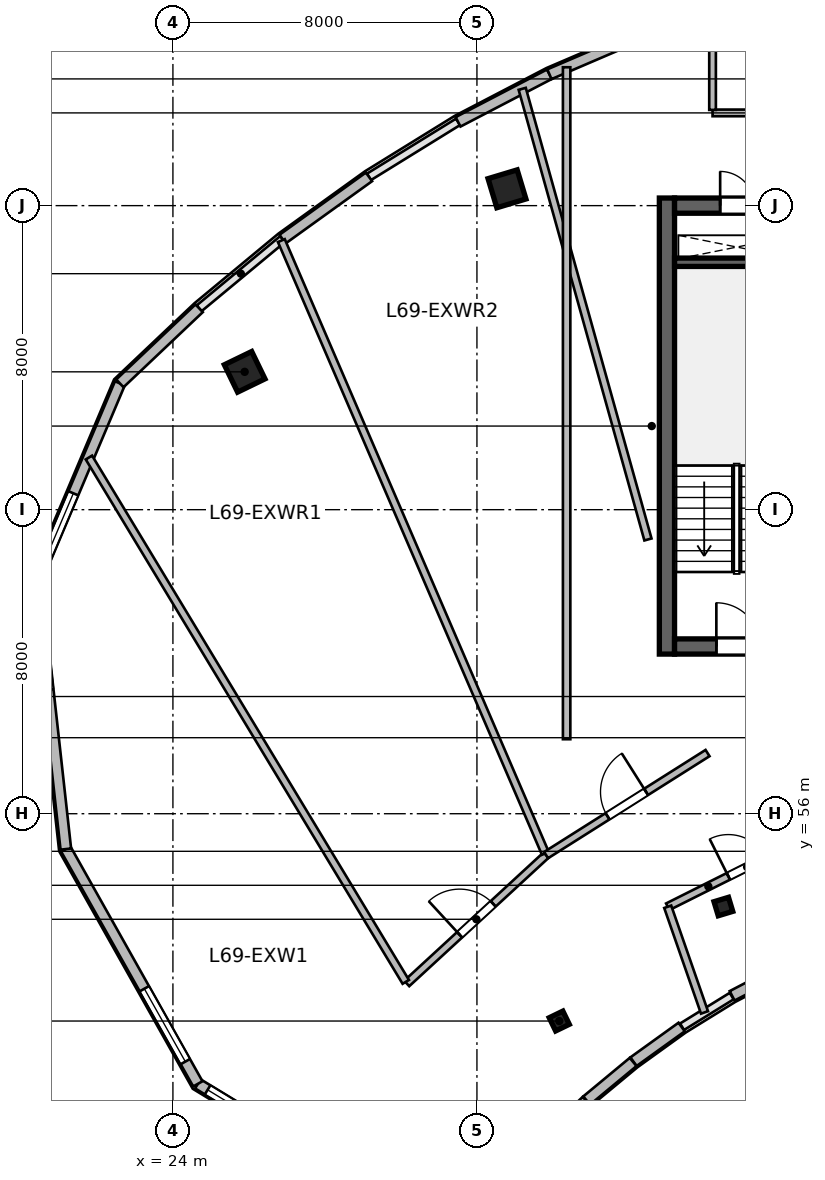
"""IFC4 building model, lengths in metres.
Left out: names, types, materials, properties, quantities, classifications, styles, units other than length and angle.
Written with IfcOpenShell. Run it as: python <this file> out.ifc"""

import sys

from ifc_helpers import new_model, si_unit, direction, frame, frame_2d, origin, origin_2d, place, context, subcontext, project, spatial, rectangle, i_section, extrude, source, transform, mapped, element, fill, save


model = new_model("IFC4")
c1 = context("Model", 3, precision=1e-05, world=origin(), true_north=direction((0.0, 1.0)))
c2 = subcontext(c1, "Body", "Model", "MODEL_VIEW")
j1 = project(units=[si_unit("LENGTHUNIT", "METRE"), si_unit("PLANEANGLEUNIT", "RADIAN")], contexts=[c1])
p1 = place(None, origin())
s1 = spatial("IfcSite", under=j1, at=p1, CompositionType="ELEMENT")
p2 = place(p1, origin())
s2 = spatial("IfcBuilding", under=s1, at=p2, CompositionType="ELEMENT")
p3 = place(p2, frame((0.0, 0.0, 283.5)))
s3 = spatial("IfcBuildingStorey", under=s2, at=p3, CompositionType="ELEMENT", Elevation=283.5)
m1 = source(origin(), c2, "Body", "SweptSolid", [
    extrude(rectangle(XDim=12.0, YDim=0.4, at=frame_2d((6.0, 0.0))), origin(), (0.0, 0.0, 1.0), 3.9),
])
p4 = place(p3, frame((37.0, 60.2, 0.0), z_axis=(0.0, 0.0, 1.0), x_axis=(0.0, 1.0, 0.0)))
e1 = element("IfcWall", 1, at=p4, inside=s3, PredefinedType="SHEAR", context=c2, shape_type="MappedRepresentation", body=[
    mapped(m1, transform((0.0, 0.0, 0.0), scale=1.0)),
])
m2 = source(origin(), c2, "Body", "SweptSolid", [
    extrude(rectangle(XDim=21.6, YDim=0.4, at=frame_2d((10.8, 0.0))), origin(), (0.0, 0.0, 1.0), 3.9),
])
p5 = place(p3, frame((37.2, 60.4, 0.0), z_axis=(0.0, 0.0, 1.0), x_axis=(1.0, 0.0, 0.0)))
e2 = element("IfcWall", 2, at=p5, inside=s3, PredefinedType="SHEAR", context=c2, shape_type="MappedRepresentation", body=[
    mapped(m2, transform((0.0, 0.0, 0.0), scale=1.0)),
])
p6 = place(p5, frame((1.1, 0.0, 0.0)))
e3 = element("IfcOpeningElement", 3, at=p6, cuts=e2, PredefinedType="OPENING", context=c2, shape_type="SweptSolid", body=[
    extrude(rectangle(XDim=1.15, YDim=2.15, at=frame_2d((0.575, 1.075))), frame((0.0, 0.21, 0.0), z_axis=(0.0, -1.0, 0.0), x_axis=(1.0, 0.0, 0.0)), (0.0, 0.0, 1.0), 0.42),
])
p7 = place(p5, frame((19.5, 0.0, 0.0)))
e4 = element("IfcOpeningElement", 4, at=p7, cuts=e2, PredefinedType="OPENING", context=c2, shape_type="SweptSolid", body=[
    extrude(rectangle(XDim=0.9, YDim=2.1, at=frame_2d((0.45, 1.05))), frame((0.0, 0.21, 0.0), z_axis=(0.0, -1.0, 0.0), x_axis=(1.0, 0.0, 0.0)), (0.0, 0.0, 1.0), 0.42),
])
p8 = place(p5, frame((12.02, 0.0, 0.0)))
e5 = element("IfcOpeningElement", 5, at=p8, cuts=e2, PredefinedType="OPENING", context=c2, shape_type="SweptSolid", body=[
    extrude(rectangle(XDim=1.6, YDim=2.15, at=frame_2d((0.8, 1.075))), frame((0.0, 0.21, 0.0), z_axis=(0.0, -1.0, 0.0), x_axis=(1.0, 0.0, 0.0)), (0.0, 0.0, 1.0), 0.42),
])
p9 = place(p3, frame((37.2, 72.0, 0.0), z_axis=(0.0, 0.0, 1.0), x_axis=(1.0, 0.0, 0.0)))
e6 = element("IfcWall", 6, at=p9, inside=s3, PredefinedType="SHEAR", context=c2, shape_type="MappedRepresentation", body=[
    mapped(m2, transform((0.0, 0.0, 0.0), scale=1.0)),
])
p10 = place(p9, frame((1.2, 0.0, 0.0)))
e7 = element("IfcOpeningElement", 7, at=p10, cuts=e6, PredefinedType="OPENING", context=c2, shape_type="SweptSolid", body=[
    extrude(rectangle(XDim=0.9, YDim=2.1, at=frame_2d((0.45, 1.05))), frame((0.0, 0.21, 0.0), z_axis=(0.0, -1.0, 0.0), x_axis=(1.0, 0.0, 0.0)), (0.0, 0.0, 1.0), 0.42),
])
p11 = place(p9, frame((14.7, 0.0, 0.0)))
e8 = element("IfcOpeningElement", 8, at=p11, cuts=e6, PredefinedType="OPENING", context=c2, shape_type="SweptSolid", body=[
    extrude(rectangle(XDim=1.2, YDim=2.15, at=frame_2d((0.6, 1.075))), frame((0.0, 0.21, 0.0), z_axis=(0.0, -1.0, 0.0), x_axis=(1.0, 0.0, 0.0)), (0.0, 0.0, 1.0), 0.42),
])
p12 = place(p9, frame((4.15, 0.0, 0.0)))
e9 = element("IfcOpeningElement", 9, at=p12, cuts=e6, PredefinedType="OPENING", context=c2, shape_type="SweptSolid", body=[
    extrude(rectangle(XDim=1.3, YDim=2.15, at=frame_2d((0.65, 1.075))), frame((0.0, 0.21, 0.0), z_axis=(0.0, -1.0, 0.0), x_axis=(1.0, 0.0, 0.0)), (0.0, 0.0, 1.0), 0.42),
])
p13 = place(p9, frame((7.25, 0.0, 0.0)))
e10 = element("IfcOpeningElement", 10, at=p13, cuts=e6, PredefinedType="OPENING", context=c2, shape_type="SweptSolid", body=[
    extrude(rectangle(XDim=0.9, YDim=2.1, at=frame_2d((0.45, 1.05))), frame((0.0, 0.21, 0.0), z_axis=(0.0, -1.0, 0.0), x_axis=(1.0, 0.0, 0.0)), (0.0, 0.0, 1.0), 0.42),
])
m3 = source(origin(), c2, "Body", "SweptSolid", [
    extrude(rectangle(XDim=3.27, YDim=0.22, at=frame_2d((1.635, 0.0))), origin(), (0.0, 0.0, 1.0), 3.9),
])
p14 = place(p3, frame((37.2, 70.51, 0.0), z_axis=(0.0, 0.0, 1.0), x_axis=(1.0, 0.0, 0.0)))
e11 = element("IfcWall", 11, at=p14, inside=s3, PredefinedType="SHEAR", context=c2, shape_type="MappedRepresentation", body=[
    mapped(m3, transform((0.0, 0.0, 0.0), scale=1.0)),
])
m4 = source(origin(), c2, "Body", "SweptSolid", [
    extrude(i_section(OverallWidth=0.399, OverallDepth=0.387, WebThickness=0.021, FlangeThickness=0.033, at=origin_2d()), origin(), (0.0, 0.0, 1.0), 3.9),
])
p15 = place(p3, frame((34.166, 50.545, 0.0), z_axis=(0.0, 0.0, 1.0), x_axis=(-0.436173672171, 0.899862504889, 0.0)))
e12 = element("IfcColumn", 12, at=p15, inside=s3, PredefinedType="COLUMN", context=c2, shape_type="MappedRepresentation", body=[
    mapped(m4, transform((0.0, 0.0, 0.0), scale=1.0)),
])
m5 = source(origin(), c2, "Body", "SweptSolid", [
    extrude(rectangle(XDim=0.8, YDim=0.8, at=origin_2d()), origin(), (0.0, 0.0, 1.0), 3.9),
])
p16 = place(p3, frame((25.888, 67.627, 0.0), z_axis=(0.0, 0.0, 1.0), x_axis=(-0.436173672171, 0.899862504889, 0.0)))
e13 = element("IfcColumn", 13, at=p16, inside=s3, PredefinedType="COLUMN", context=c2, shape_type="MappedRepresentation", body=[
    mapped(m5, transform((0.0, 0.0, 0.0), scale=1.0)),
])
p17 = place(p3, frame((38.485, 53.558, 0.0), z_axis=(0.0, 0.0, 1.0), x_axis=(-0.288697611798, 0.957420330337, 0.0)))
e14 = element("IfcColumn", 14, at=p17, inside=s3, PredefinedType="COLUMN", context=c2, shape_type="MappedRepresentation", body=[
    mapped(m4, transform((0.0, 0.0, 0.0), scale=1.0)),
])
p18 = place(p3, frame((32.791, 72.442, 0.0), z_axis=(0.0, 0.0, 1.0), x_axis=(-0.288697611798, 0.957420330337, 0.0)))
e15 = element("IfcColumn", 15, at=p18, inside=s3, PredefinedType="COLUMN", context=c2, shape_type="MappedRepresentation", body=[
    mapped(m5, transform((0.0, 0.0, 0.0), scale=1.0)),
])
m6 = source(origin(), c2, "Body", "SweptSolid", [
    extrude(rectangle(XDim=1.512, YDim=0.28, at=frame_2d((0.756, 0.0))), origin(), (0.0, 0.0, 1.0), 3.64),
])
p19 = place(p3, frame((40.056, 51.906, 0.0), z_axis=(0.0, 0.0, 1.0), x_axis=(-0.886841011195, -0.462074691865, 0.0)))
e16 = element("IfcWall", 16, at=p19, inside=s3, PredefinedType="SOLIDWALL", context=c2, shape_type="MappedRepresentation", body=[
    mapped(m6, transform((0.0, 0.0, 0.0), scale=1.0)),
])
m7 = source(origin(), c2, "Body", "SweptSolid", [
    extrude(rectangle(XDim=1.561, YDim=0.28, at=frame_2d((0.781, 0.0))), origin(), (0.0, 0.0, 1.0), 3.64),
])
p20 = place(p3, frame((37.387, 50.387, 0.0), z_axis=(0.0, 0.0, 1.0), x_axis=(-0.81154027425, -0.584296485758, 0.0)))
e17 = element("IfcWall", 17, at=p20, inside=s3, PredefinedType="SOLIDWALL", context=c2, shape_type="MappedRepresentation", body=[
    mapped(m7, transform((0.0, 0.0, 0.0), scale=1.0)),
])
m8 = source(origin(), c2, "Body", "SweptSolid", [
    extrude(rectangle(XDim=1.589, YDim=0.28, at=frame_2d((0.794, 0.0))), origin(), (0.0, 0.0, 1.0), 3.64),
])
p21 = place(p3, frame((36.11, 49.468, 0.0), z_axis=(0.0, 0.0, 1.0), x_axis=(-0.769805836273, -0.63827813251, 0.0)))
e18 = element("IfcWall", 18, at=p21, inside=s3, PredefinedType="SOLIDWALL", context=c2, shape_type="MappedRepresentation", body=[
    mapped(m8, transform((0.0, 0.0, 0.0), scale=1.0)),
])
m9 = source(origin(), c2, "Body", "SweptSolid", [
    extrude(rectangle(XDim=1.577, YDim=0.28, at=frame_2d((0.789, 0.0))), origin(), (0.0, 0.0, 1.0), 3.64),
])
p22 = place(p3, frame((34.878, 48.446, 0.0), z_axis=(0.0, 0.0, 1.0), x_axis=(-0.726119464467, -0.687568558998, 0.0)))
e19 = element("IfcWall", 19, at=p22, inside=s3, PredefinedType="SOLIDWALL", context=c2, shape_type="MappedRepresentation", body=[
    mapped(m9, transform((0.0, 0.0, 0.0), scale=1.0)),
])
m10 = source(origin(), c2, "Body", "SweptSolid", [
    extrude(rectangle(XDim=5.604, YDim=0.28, at=frame_2d((2.802, 0.0))), origin(), (0.0, 0.0, 1.0), 3.64),
])
p23 = place(p3, frame((29.442, 45.976, 0.0), z_axis=(0.0, 0.0, 1.0), x_axis=(-0.854002492971, 0.520268913158, 0.0)))
e20 = element("IfcWall", 20, at=p23, inside=s3, PredefinedType="SOLIDWALL", context=c2, shape_type="MappedRepresentation", body=[
    mapped(m10, transform((0.0, 0.0, 0.0), scale=1.0)),
])
p24 = place(p23, frame((3.103, 0.0, 0.95)))
e21 = element("IfcOpeningElement", 21, at=p24, cuts=e20, PredefinedType="OPENING", context=c2, shape_type="SweptSolid", body=[
    extrude(rectangle(XDim=2.2, YDim=2.1, at=frame_2d((1.1, 1.05))), frame((0.0, 0.15, 0.0), z_axis=(0.0, -1.0, 0.0), x_axis=(1.0, 0.0, 0.0)), (0.0, 0.0, 1.0), 0.3),
])
m11 = source(origin(), c2, "Body", "SweptSolid", [
    extrude(rectangle(XDim=7.087, YDim=0.28, at=frame_2d((3.543, 0.0))), origin(), (0.0, 0.0, 1.0), 3.64),
])
p25 = place(p3, frame((24.656, 48.892, 0.0), z_axis=(0.0, 0.0, 1.0), x_axis=(-0.490158199368, 0.871633489256, 0.0)))
e22 = element("IfcWall", 22, at=p25, inside=s3, PredefinedType="SOLIDWALL", context=c2, shape_type="MappedRepresentation", body=[
    mapped(m11, transform((0.0, 0.0, 0.0), scale=1.0)),
])
p26 = place(p25, frame((0.672, 0.0, 0.95)))
e23 = element("IfcOpeningElement", 23, at=p26, cuts=e22, PredefinedType="OPENING", context=c2, shape_type="SweptSolid", body=[
    extrude(rectangle(XDim=2.2, YDim=2.1, at=frame_2d((1.1, 1.05))), frame((0.0, 0.15, 0.0), z_axis=(0.0, -1.0, 0.0), x_axis=(1.0, 0.0, 0.0)), (0.0, 0.0, 1.0), 0.3),
])
m12 = source(origin(), c2, "Body", "SweptSolid", [
    extrude(rectangle(XDim=7.09, YDim=0.28, at=frame_2d((3.545, 0.0))), origin(), (0.0, 0.0, 1.0), 3.64),
])
p27 = place(p3, frame((21.182, 55.069, 0.0), z_axis=(0.0, 0.0, 1.0), x_axis=(-0.110159396922, 0.993913933532, 0.0)))
e24 = element("IfcWall", 24, at=p27, inside=s3, PredefinedType="SOLIDWALL", context=c2, shape_type="MappedRepresentation", body=[
    mapped(m12, transform((0.0, 0.0, 0.0), scale=1.0)),
])
p28 = place(p27, frame((4.217, 0.0, 0.95)))
e25 = element("IfcOpeningElement", 25, at=p28, cuts=e24, PredefinedType="OPENING", context=c2, shape_type="SweptSolid", body=[
    extrude(rectangle(XDim=2.2, YDim=2.1, at=frame_2d((1.1, 1.05))), frame((0.0, 0.15, 0.0), z_axis=(0.0, -1.0, 0.0), x_axis=(1.0, 0.0, 0.0)), (0.0, 0.0, 1.0), 0.3),
])
m13 = source(origin(), c2, "Body", "SweptSolid", [
    extrude(rectangle(XDim=5.655, YDim=0.28, at=frame_2d((2.828, 0.0))), origin(), (0.0, 0.0, 1.0), 3.64),
])
p29 = place(p3, frame((20.401, 62.116, 0.0), z_axis=(0.0, 0.0, 1.0), x_axis=(0.389585063528, 0.920990487614, 0.0)))
e26 = element("IfcWall", 26, at=p29, inside=s3, PredefinedType="SOLIDWALL", context=c2, shape_type="MappedRepresentation", body=[
    mapped(m13, transform((0.0, 0.0, 0.0), scale=1.0)),
])
p30 = place(p29, frame((0.314, 0.0, 0.95)))
e27 = element("IfcOpeningElement", 27, at=p30, cuts=e26, PredefinedType="OPENING", context=c2, shape_type="SweptSolid", body=[
    extrude(rectangle(XDim=2.2, YDim=2.1, at=frame_2d((1.1, 1.05))), frame((0.0, 0.15, 0.0), z_axis=(0.0, -1.0, 0.0), x_axis=(1.0, 0.0, 0.0)), (0.0, 0.0, 1.0), 0.3),
])
m14 = source(origin(), c2, "Body", "SweptSolid", [
    extrude(rectangle(XDim=2.873, YDim=0.28, at=frame_2d((1.436, 0.0))), origin(), (0.0, 0.0, 1.0), 3.64),
])
p31 = place(p3, frame((22.604, 67.324, 0.0), z_axis=(0.0, 0.0, 1.0), x_axis=(0.72609560544, 0.687593754888, 0.0)))
e28 = element("IfcWall", 28, at=p31, inside=s3, PredefinedType="SOLIDWALL", context=c2, shape_type="MappedRepresentation", body=[
    mapped(m14, transform((0.0, 0.0, 0.0), scale=1.0)),
])
m15 = source(origin(), c2, "Body", "SweptSolid", [
    extrude(rectangle(XDim=2.802, YDim=0.28, at=frame_2d((1.401, 0.0))), origin(), (0.0, 0.0, 1.0), 3.64),
])
p32 = place(p3, frame((26.885, 71.12, 0.0), z_axis=(0.0, 0.0, 1.0), x_axis=(0.811507896482, 0.584341453217, 0.0)))
e29 = element("IfcWall", 29, at=p32, inside=s3, PredefinedType="SOLIDWALL", context=c2, shape_type="MappedRepresentation", body=[
    mapped(m15, transform((0.0, 0.0, 0.0), scale=1.0)),
])
m16 = source(origin(), c2, "Body", "SweptSolid", [
    extrude(rectangle(XDim=2.711, YDim=0.28, at=frame_2d((1.356, 0.0))), origin(), (0.0, 0.0, 1.0), 3.64),
])
p33 = place(p3, frame((31.502, 74.205, 0.0), z_axis=(0.0, 0.0, 1.0), x_axis=(0.886828760751, 0.462098202881, 0.0)))
e30 = element("IfcWall", 30, at=p33, inside=s3, PredefinedType="SOLIDWALL", context=c2, shape_type="MappedRepresentation", body=[
    mapped(m16, transform((0.0, 0.0, 0.0), scale=1.0)),
])
m17 = source(origin(), c2, "Body", "SweptSolid", [
    extrude(rectangle(XDim=2.673, YDim=0.28, at=frame_2d((1.337, 0.0))), origin(), (0.0, 0.0, 1.0), 3.64),
])
p34 = place(p3, frame((33.907, 75.458, 0.0), z_axis=(0.0, 0.0, 1.0), x_axis=(0.919036345912, 0.394172798266, 0.0)))
e31 = element("IfcWall", 31, at=p34, inside=s3, PredefinedType="SOLIDWALL", context=c2, shape_type="MappedRepresentation", body=[
    mapped(m17, transform((0.0, 0.0, 0.0), scale=1.0)),
])
m18 = source(origin(), c2, "Body", "SweptSolid", [
    extrude(rectangle(XDim=4.0, YDim=0.175, at=frame_2d((2.0, 0.0))), origin(), (0.0, 0.0, 1.0), 3.64),
])
p35 = place(p3, frame((38.2, 74.44, 0.0), z_axis=(0.0, 0.0, 1.0), x_axis=(1.0, 0.0, 0.0)))
e32 = element("IfcWall", 32, at=p35, inside=s3, PredefinedType="PARTITIONING", context=c2, shape_type="MappedRepresentation", body=[
    mapped(m18, transform((0.0, 0.0, 0.0), scale=1.0)),
])
p36 = place(p35, frame((2.7, 0.0, 0.0)))
e33 = element("IfcOpeningElement", 33, at=p36, cuts=e32, PredefinedType="OPENING", context=c2, shape_type="SweptSolid", body=[
    extrude(rectangle(XDim=0.9, YDim=2.08, at=frame_2d((0.45, 1.04))), frame((0.0, 0.098, 0.0), z_axis=(0.0, -1.0, 0.0), x_axis=(1.0, 0.0, 0.0)), (0.0, 0.0, 1.0), 0.195),
])
m19 = source(origin(), c2, "Body", "SweptSolid", [
    extrude(rectangle(XDim=2.403, YDim=0.175, at=frame_2d((1.201, 0.0))), origin(), (0.0, 0.0, 1.0), 3.64),
])
p37 = place(p3, frame((38.2, 74.519, 0.0), z_axis=(0.0, 0.0, 1.0), x_axis=(0.0, 1.0, 0.0)))
e34 = element("IfcWall", 34, at=p37, inside=s3, PredefinedType="PARTITIONING", context=c2, shape_type="MappedRepresentation", body=[
    mapped(m19, transform((0.0, 0.0, 0.0), scale=1.0)),
])
m20 = source(origin(), c2, "Body", "SweptSolid", [
    extrude(rectangle(XDim=4.271, YDim=0.195, at=frame_2d((2.135, 0.0))), origin(), (0.0, 0.0, 1.0), 3.64),
])
p38 = place(p3, frame((37.021, 53.552, 0.0), z_axis=(0.0, 0.0, 1.0), x_axis=(0.894061035522, 0.447945158207, 0.0)))
e35 = element("IfcWall", 35, at=p38, inside=s3, PredefinedType="PARTITIONING", context=c2, shape_type="MappedRepresentation", body=[
    mapped(m20, transform((0.0, 0.0, 0.0), scale=1.0)),
])
p39 = place(p38, frame((1.785, 0.0, 0.0)))
e36 = element("IfcOpeningElement", 36, at=p39, cuts=e35, PredefinedType="OPENING", context=c2, shape_type="SweptSolid", body=[
    extrude(rectangle(XDim=1.1, YDim=2.15, at=frame_2d((0.55, 1.075))), frame((0.0, 0.107, 0.0), z_axis=(0.0, -1.0, 0.0), x_axis=(1.0, 0.0, 0.0)), (0.0, 0.0, 1.0), 0.215),
])
m21 = source(origin(), c2, "Body", "SweptSolid", [
    extrude(rectangle(XDim=2.944, YDim=0.195, at=frame_2d((1.472, 0.0))), origin(), (0.0, 0.0, 1.0), 3.64),
])
p40 = place(p3, frame((37.988, 50.771, 0.0), z_axis=(0.0, 0.0, 1.0), x_axis=(-0.328565655286, 0.944481132774, 0.0)))
e37 = element("IfcWall", 37, at=p40, inside=s3, PredefinedType="PARTITIONING", context=c2, shape_type="MappedRepresentation", body=[
    mapped(m21, transform((0.0, 0.0, 0.0), scale=1.0)),
])
m22 = source(origin(), c2, "Body", "SweptSolid", [
    extrude(rectangle(XDim=4.986, YDim=0.195, at=frame_2d((2.493, 0.0))), origin(), (0.0, 0.0, 1.0), 3.64),
])
p41 = place(p3, frame((30.153, 51.533, 0.0), z_axis=(0.0, 0.0, 1.0), x_axis=(0.735595190169, 0.677421372707, 0.0)))
e38 = element("IfcWall", 38, at=p41, inside=s3, PredefinedType="PARTITIONING", context=c2, shape_type="MappedRepresentation", body=[
    mapped(m22, transform((0.0, 0.0, 0.0), scale=1.0)),
])
p42 = place(p41, frame((1.893, 0.0, 0.0)))
e39 = element("IfcOpeningElement", 39, at=p42, cuts=e38, PredefinedType="OPENING", context=c2, shape_type="SweptSolid", body=[
    extrude(rectangle(XDim=1.2, YDim=2.15, at=frame_2d((0.6, 1.075))), frame((0.0, 0.107, 0.0), z_axis=(0.0, -1.0, 0.0), x_axis=(1.0, 0.0, 0.0)), (0.0, 0.0, 1.0), 0.215),
])
m23 = source(origin(), c2, "Body", "SweptSolid", [
    extrude(rectangle(XDim=16.121, YDim=0.195, at=frame_2d((8.061, 0.0))), origin(), (0.0, 0.0, 1.0), 3.64),
])
p43 = place(p3, frame((30.127, 51.575, 0.0), z_axis=(0.0, 0.0, 1.0), x_axis=(-0.517212483904, 0.855857024563, 0.0)))
e40 = element("IfcWall", 40, at=p43, inside=s3, PredefinedType="PARTITIONING", context=c2, shape_type="MappedRepresentation", body=[
    mapped(m23, transform((0.0, 0.0, 0.0), scale=1.0)),
])
m24 = source(origin(), c2, "Body", "SweptSolid", [
    extrude(rectangle(XDim=17.556, YDim=0.195, at=frame_2d((8.778, 0.0))), origin(), (0.0, 0.0, 1.0), 3.64),
])
p44 = place(p3, frame((33.8, 54.958, 0.0), z_axis=(0.0, 0.0, 1.0), x_axis=(-0.395687598313, 0.918385172213, 0.0)))
e41 = element("IfcWall", 41, at=p44, inside=s3, PredefinedType="PARTITIONING", context=c2, shape_type="MappedRepresentation", body=[
    mapped(m24, transform((0.0, 0.0, 0.0), scale=1.0)),
])
m25 = source(origin(), c2, "Body", "SweptSolid", [
    extrude(rectangle(XDim=5.025, YDim=0.195, at=frame_2d((2.513, 0.0))), origin(), (0.0, 0.0, 1.0), 3.64),
])
p45 = place(p3, frame((33.82, 54.911, 0.0), z_axis=(0.0, 0.0, 1.0), x_axis=(0.84532378062, 0.534254345717, 0.0)))
e42 = element("IfcWall", 42, at=p45, inside=s3, PredefinedType="PARTITIONING", context=c2, shape_type="MappedRepresentation", body=[
    mapped(m25, transform((0.0, 0.0, 0.0), scale=1.0)),
])
p46 = place(p45, frame((1.913, 0.0, 0.0)))
e43 = element("IfcOpeningElement", 43, at=p46, cuts=e42, PredefinedType="OPENING", context=c2, shape_type="SweptSolid", body=[
    extrude(rectangle(XDim=1.2, YDim=2.15, at=frame_2d((0.6, 1.075))), frame((0.0, 0.107, 0.0), z_axis=(0.0, -1.0, 0.0), x_axis=(1.0, 0.0, 0.0)), (0.0, 0.0, 1.0), 0.215),
])
m26 = source(origin(), c2, "Body", "SweptSolid", [
    extrude(rectangle(XDim=12.311, YDim=0.195, at=frame_2d((6.155, 0.0))), origin(), (0.0, 0.0, 1.0), 3.64),
])
p47 = place(p3, frame((36.5, 63.216, 0.0), z_axis=(0.0, 0.0, 1.0), x_axis=(-0.268759602651, 0.963207286093, 0.0)))
e44 = element("IfcWall", 44, at=p47, inside=s3, PredefinedType="PARTITIONING", context=c2, shape_type="MappedRepresentation", body=[
    mapped(m26, transform((0.0, 0.0, 0.0), scale=1.0)),
])
m27 = source(origin(), c2, "Body", "SweptSolid", [
    extrude(rectangle(XDim=17.681, YDim=0.195, at=frame_2d((8.84, 0.0))), origin(), (0.0, 0.0, 1.0), 3.64),
])
p48 = place(p3, frame((34.36, 57.96, 0.0), z_axis=(0.0, 0.0, 1.0), x_axis=(0.0, 1.0, 0.0)))
e45 = element("IfcWall", 45, at=p48, inside=s3, PredefinedType="PARTITIONING", context=c2, shape_type="MappedRepresentation", body=[
    mapped(m27, transform((0.0, 0.0, 0.0), scale=1.0)),
])
m28 = source(origin(), c2, "Body", "SweptSolid", [
    extrude(rectangle(XDim=2.2, YDim=2.1, at=frame_2d((1.1, 1.05))), frame((0.0, 0.03, 0.0), z_axis=(0.0, -1.0, 0.0), x_axis=(1.0, 0.0, 0.0)), (0.0, 0.0, 1.0), 0.06),
])
p49 = place(p24, origin())
e46 = element("IfcWindow", 46, at=p49, inside=s3, PartitioningType="TRIPLE_PANEL_VERTICAL", PredefinedType="WINDOW", context=c2, shape_type="MappedRepresentation", body=[
    mapped(m28, transform((0.0, 0.0, 0.0), scale=1.0)),
])
fill(e21, e46)
p50 = place(p26, origin())
e47 = element("IfcWindow", 47, at=p50, inside=s3, PartitioningType="TRIPLE_PANEL_VERTICAL", PredefinedType="WINDOW", context=c2, shape_type="MappedRepresentation", body=[
    mapped(m28, transform((0.0, 0.0, 0.0), scale=1.0)),
])
fill(e23, e47)
p51 = place(p30, origin())
e48 = element("IfcWindow", 48, at=p51, inside=s3, PartitioningType="TRIPLE_PANEL_VERTICAL", PredefinedType="WINDOW", context=c2, shape_type="MappedRepresentation", body=[
    mapped(m28, transform((0.0, 0.0, 0.0), scale=1.0)),
])
fill(e27, e48)
m29 = source(origin(), c2, "Body", "SweptSolid", [
    extrude(rectangle(XDim=1.15, YDim=2.15, at=frame_2d((0.575, 1.075))), frame((0.0, 0.025, 0.0), z_axis=(0.0, -1.0, 0.0), x_axis=(1.0, 0.0, 0.0)), (0.0, 0.0, 1.0), 0.05),
])
p52 = place(p6, origin())
e49 = element("IfcDoor", 49, at=p52, inside=s3, OperationType="SINGLE_SWING_LEFT", PredefinedType="DOOR", context=c2, shape_type="MappedRepresentation", body=[
    mapped(m29, transform((0.0, 0.0, 0.0), scale=1.0)),
])
fill(e3, e49)
m30 = source(origin(), c2, "Body", "SweptSolid", [
    extrude(rectangle(XDim=0.9, YDim=2.1, at=frame_2d((0.45, 1.05))), frame((0.0, 0.025, 0.0), z_axis=(0.0, -1.0, 0.0), x_axis=(1.0, 0.0, 0.0)), (0.0, 0.0, 1.0), 0.05),
])
p53 = place(p10, origin())
e50 = element("IfcDoor", 50, at=p53, inside=s3, OperationType="SINGLE_SWING_LEFT", PredefinedType="DOOR", context=c2, shape_type="MappedRepresentation", body=[
    mapped(m30, transform((0.0, 0.0, 0.0), scale=1.0)),
])
fill(e7, e50)
m31 = source(origin(), c2, "Body", "SweptSolid", [
    extrude(rectangle(XDim=1.1, YDim=2.15, at=frame_2d((0.55, 1.075))), frame((0.0, 0.025, 0.0), z_axis=(0.0, -1.0, 0.0), x_axis=(1.0, 0.0, 0.0)), (0.0, 0.0, 1.0), 0.05),
])
p54 = place(p39, origin())
e51 = element("IfcDoor", 51, at=p54, inside=s3, OperationType="SINGLE_SWING_LEFT", PredefinedType="DOOR", context=c2, shape_type="MappedRepresentation", body=[
    mapped(m31, transform((0.0, 0.0, 0.0), scale=1.0)),
])
fill(e36, e51)
m32 = source(origin(), c2, "Body", "SweptSolid", [
    extrude(rectangle(XDim=1.2, YDim=2.15, at=frame_2d((0.6, 1.075))), frame((0.0, 0.025, 0.0), z_axis=(0.0, -1.0, 0.0), x_axis=(1.0, 0.0, 0.0)), (0.0, 0.0, 1.0), 0.05),
])
p55 = place(p42, origin())
e52 = element("IfcDoor", 52, at=p55, inside=s3, OperationType="SINGLE_SWING_LEFT", PredefinedType="DOOR", context=c2, shape_type="MappedRepresentation", body=[
    mapped(m32, transform((0.0, 0.0, 0.0), scale=1.0)),
])
fill(e39, e52)
p56 = place(p46, origin())
e53 = element("IfcDoor", 53, at=p56, inside=s3, OperationType="SINGLE_SWING_RIGHT", PredefinedType="DOOR", context=c2, shape_type="MappedRepresentation", body=[
    mapped(m32, transform((0.0, 0.0, 0.0), scale=1.0)),
])
fill(e43, e53)
save(model, sys.argv[1])
